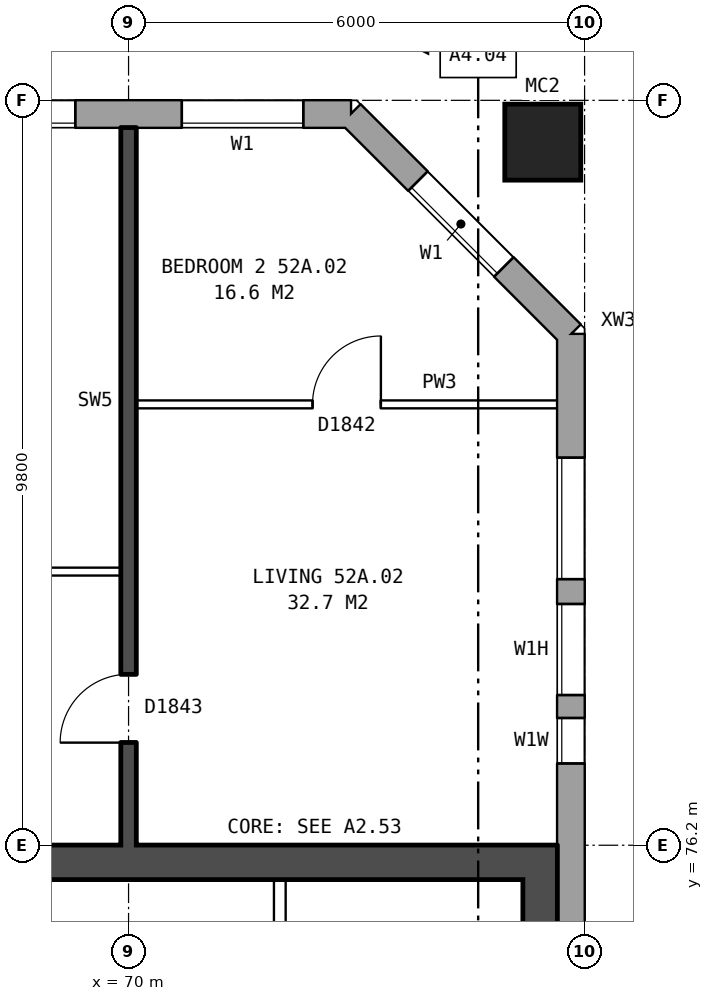
"""IFC4 building model, lengths in metres.
Left out: names, types, materials, properties, quantities, classifications, styles, units other than length and angle.
Written with IfcOpenShell. Run it as: python <this file> out.ifc"""

import sys

from ifc_helpers import new_model, si_unit, direction, frame, frame_2d, origin, origin_2d, place, context, subcontext, project, spatial, rectangle, hollow_rectangle, extrude, element, fill, save


model = new_model("IFC4")
c1 = context("Model", 3, precision=1e-05, world=origin(), true_north=direction((0.0, 1.0)))
c2 = subcontext(c1, "Body", "Model", "MODEL_VIEW")
j1 = project(units=[si_unit("LENGTHUNIT", "METRE"), si_unit("PLANEANGLEUNIT", "RADIAN")], contexts=[c1])
p1 = place(None, origin())
s1 = spatial("IfcSite", under=j1, at=p1, CompositionType="ELEMENT")
p2 = place(p1, origin())
s2 = spatial("IfcBuilding", under=s1, at=p2, CompositionType="ELEMENT")
p3 = place(p2, frame((0.0, 0.0, 185.1)))
s3 = spatial("IfcBuildingStorey", under=s2, at=p3, CompositionType="ELEMENT", Elevation=185.1)
p4 = place(p3, frame((75.45, 85.45, 0.0), z_axis=(0.0, 0.0, 1.0), x_axis=(1.0, 0.0, 0.0)))
e1 = element("IfcColumn", 1, at=p4, inside=s3, PredefinedType="COLUMN", context=c2, shape_type="SweptSolid", body=[
    extrude(hollow_rectangle(XDim=1.0, YDim=1.0, WallThickness=0.055, at=origin_2d()), origin(), (0.0, 0.0, 1.0), 3.1),
])
p5 = place(p3, frame((75.82, 57.075, 0.0), z_axis=(0.0, 0.0, 1.0), x_axis=(0.0, 1.0, 0.0)))
e2 = element("IfcWall", 2, at=p5, inside=s3, PredefinedType="STANDARD", context=c2, shape_type="SweptSolid", body=[
    extrude(rectangle(XDim=25.851, YDim=0.36, at=frame_2d((12.925, 0.0))), origin(), (0.0, 0.0, 1.0), 2.85),
])
p6 = place(p5, frame((1.625, 0.0, 0.8)))
e3 = element("IfcOpeningElement", 3, at=p6, cuts=e2, PredefinedType="OPENING", context=c2, shape_type="SweptSolid", body=[
    extrude(rectangle(XDim=1.6, YDim=1.8, at=frame_2d((0.8, 0.9))), frame((0.0, 0.19, 0.0), z_axis=(0.0, -1.0, 0.0), x_axis=(1.0, 0.0, 0.0)), (0.0, 0.0, 1.0), 0.38),
])
p7 = place(p5, frame((3.525, 0.0, 0.8)))
e4 = element("IfcOpeningElement", 4, at=p7, cuts=e2, PredefinedType="OPENING", context=c2, shape_type="SweptSolid", body=[
    extrude(rectangle(XDim=0.8, YDim=1.8, at=frame_2d((0.4, 0.9))), frame((0.0, 0.19, 0.0), z_axis=(0.0, -1.0, 0.0), x_axis=(1.0, 0.0, 0.0)), (0.0, 0.0, 1.0), 0.38),
])
p8 = place(p5, frame((20.2, 0.0, 0.8)))
e5 = element("IfcOpeningElement", 5, at=p8, cuts=e2, PredefinedType="OPENING", context=c2, shape_type="SweptSolid", body=[
    extrude(rectangle(XDim=0.6, YDim=0.9, at=frame_2d((0.3, 0.45))), frame((0.0, 0.19, 0.0), z_axis=(0.0, -1.0, 0.0), x_axis=(1.0, 0.0, 0.0)), (0.0, 0.0, 1.0), 0.38),
])
p9 = place(p5, frame((22.625, 0.0, 0.8)))
e6 = element("IfcOpeningElement", 6, at=p9, cuts=e2, PredefinedType="OPENING", context=c2, shape_type="SweptSolid", body=[
    extrude(rectangle(XDim=1.6, YDim=1.8, at=frame_2d((0.8, 0.9))), frame((0.0, 0.19, 0.0), z_axis=(0.0, -1.0, 0.0), x_axis=(1.0, 0.0, 0.0)), (0.0, 0.0, 1.0), 0.38),
])
p10 = place(p5, frame((4.625, 0.0, 0.8)))
e7 = element("IfcOpeningElement", 7, at=p10, cuts=e2, PredefinedType="OPENING", context=c2, shape_type="SweptSolid", body=[
    extrude(rectangle(XDim=1.0, YDim=0.9, at=frame_2d((0.5, 0.45))), frame((0.0, 0.19, 0.0), z_axis=(0.0, -1.0, 0.0), x_axis=(1.0, 0.0, 0.0)), (0.0, 0.0, 1.0), 0.38),
])
p11 = place(p5, frame((21.1, 0.0, 0.8)))
e8 = element("IfcOpeningElement", 8, at=p11, cuts=e2, PredefinedType="OPENING", context=c2, shape_type="SweptSolid", body=[
    extrude(rectangle(XDim=1.2, YDim=1.5, at=frame_2d((0.6, 0.75))), frame((0.0, 0.19, 0.0), z_axis=(0.0, -1.0, 0.0), x_axis=(1.0, 0.0, 0.0)), (0.0, 0.0, 1.0), 0.38),
])
p12 = place(p3, frame((75.82, 82.925, 0.0), z_axis=(0.0, 0.0, 1.0), x_axis=(-0.707106781187, 0.707106781187, 0.0)))
e9 = element("IfcWall", 9, at=p12, inside=s3, PredefinedType="STANDARD", context=c2, shape_type="SweptSolid", body=[
    extrude(rectangle(XDim=4.094, YDim=0.36, at=frame_2d((2.047, 0.0))), origin(), (0.0, 0.0, 1.0), 2.85),
])
p13 = place(p12, frame((1.247, 0.0, 0.8)))
e10 = element("IfcOpeningElement", 10, at=p13, cuts=e9, PredefinedType="OPENING", context=c2, shape_type="SweptSolid", body=[
    extrude(rectangle(XDim=1.6, YDim=1.8, at=frame_2d((0.8, 0.9))), frame((0.0, 0.19, 0.0), z_axis=(0.0, -1.0, 0.0), x_axis=(1.0, 0.0, 0.0)), (0.0, 0.0, 1.0), 0.38),
])
p14 = place(p3, frame((72.925, 85.82, 0.0), z_axis=(0.0, 0.0, 1.0), x_axis=(-1.0, 0.0, 0.0)))
e11 = element("IfcWall", 11, at=p14, inside=s3, PredefinedType="STANDARD", context=c2, shape_type="SweptSolid", body=[
    extrude(rectangle(XDim=39.601, YDim=0.36, at=frame_2d((19.8, 0.0))), origin(), (0.0, 0.0, 1.0), 2.85),
])
p15 = place(p14, frame((0.625, 0.0, 0.8)))
e12 = element("IfcOpeningElement", 12, at=p15, cuts=e11, PredefinedType="OPENING", context=c2, shape_type="SweptSolid", body=[
    extrude(rectangle(XDim=1.6, YDim=1.8, at=frame_2d((0.8, 0.9))), frame((0.0, 0.19, 0.0), z_axis=(0.0, -1.0, 0.0), x_axis=(1.0, 0.0, 0.0)), (0.0, 0.0, 1.0), 0.38),
])
p16 = place(p14, frame((3.625, 0.0, 0.8)))
e13 = element("IfcOpeningElement", 13, at=p16, cuts=e11, PredefinedType="OPENING", context=c2, shape_type="SweptSolid", body=[
    extrude(rectangle(XDim=1.6, YDim=1.8, at=frame_2d((0.8, 0.9))), frame((0.0, 0.19, 0.0), z_axis=(0.0, -1.0, 0.0), x_axis=(1.0, 0.0, 0.0)), (0.0, 0.0, 1.0), 0.38),
])
p17 = place(p14, frame((6.625, 0.0, 0.8)))
e14 = element("IfcOpeningElement", 14, at=p17, cuts=e11, PredefinedType="OPENING", context=c2, shape_type="SweptSolid", body=[
    extrude(rectangle(XDim=1.6, YDim=1.8, at=frame_2d((0.8, 0.9))), frame((0.0, 0.19, 0.0), z_axis=(0.0, -1.0, 0.0), x_axis=(1.0, 0.0, 0.0)), (0.0, 0.0, 1.0), 0.38),
])
p18 = place(p14, frame((9.625, 0.0, 0.8)))
e15 = element("IfcOpeningElement", 15, at=p18, cuts=e11, PredefinedType="OPENING", context=c2, shape_type="SweptSolid", body=[
    extrude(rectangle(XDim=1.6, YDim=1.8, at=frame_2d((0.8, 0.9))), frame((0.0, 0.19, 0.0), z_axis=(0.0, -1.0, 0.0), x_axis=(1.0, 0.0, 0.0)), (0.0, 0.0, 1.0), 0.38),
])
p19 = place(p14, frame((13.525, 0.0, 0.65)))
e16 = element("IfcOpeningElement", 16, at=p19, cuts=e11, PredefinedType="OPENING", context=c2, shape_type="SweptSolid", body=[
    extrude(rectangle(XDim=1.2, YDim=1.5, at=frame_2d((0.6, 0.75))), frame((0.0, 0.19, 0.0), z_axis=(0.0, -1.0, 0.0), x_axis=(1.0, 0.0, 0.0)), (0.0, 0.0, 1.0), 0.38),
])
p20 = place(p14, frame((15.625, 0.0, 0.8)))
e17 = element("IfcOpeningElement", 17, at=p20, cuts=e11, PredefinedType="OPENING", context=c2, shape_type="SweptSolid", body=[
    extrude(rectangle(XDim=1.6, YDim=1.8, at=frame_2d((0.8, 0.9))), frame((0.0, 0.19, 0.0), z_axis=(0.0, -1.0, 0.0), x_axis=(1.0, 0.0, 0.0)), (0.0, 0.0, 1.0), 0.38),
])
p21 = place(p14, frame((18.625, 0.0, 0.8)))
e18 = element("IfcOpeningElement", 18, at=p21, cuts=e11, PredefinedType="OPENING", context=c2, shape_type="SweptSolid", body=[
    extrude(rectangle(XDim=1.6, YDim=1.8, at=frame_2d((0.8, 0.9))), frame((0.0, 0.19, 0.0), z_axis=(0.0, -1.0, 0.0), x_axis=(1.0, 0.0, 0.0)), (0.0, 0.0, 1.0), 0.38),
])
p22 = place(p14, frame((21.625, 0.0, 0.8)))
e19 = element("IfcOpeningElement", 19, at=p22, cuts=e11, PredefinedType="OPENING", context=c2, shape_type="SweptSolid", body=[
    extrude(rectangle(XDim=1.6, YDim=1.8, at=frame_2d((0.8, 0.9))), frame((0.0, 0.19, 0.0), z_axis=(0.0, -1.0, 0.0), x_axis=(1.0, 0.0, 0.0)), (0.0, 0.0, 1.0), 0.38),
])
p23 = place(p14, frame((24.075, 0.0, 0.8)))
e20 = element("IfcOpeningElement", 20, at=p23, cuts=e11, PredefinedType="OPENING", context=c2, shape_type="SweptSolid", body=[
    extrude(rectangle(XDim=1.4, YDim=1.8, at=frame_2d((0.7, 0.9))), frame((0.0, 0.19, 0.0), z_axis=(0.0, -1.0, 0.0), x_axis=(1.0, 0.0, 0.0)), (0.0, 0.0, 1.0), 0.38),
])
p24 = place(p14, frame((27.625, 0.0, 1.7)))
e21 = element("IfcOpeningElement", 21, at=p24, cuts=e11, PredefinedType="OPENING", context=c2, shape_type="SweptSolid", body=[
    extrude(rectangle(XDim=0.8, YDim=0.9, at=frame_2d((0.4, 0.45))), frame((0.0, 0.19, 0.0), z_axis=(0.0, -1.0, 0.0), x_axis=(1.0, 0.0, 0.0)), (0.0, 0.0, 1.0), 0.38),
])
p25 = place(p14, frame((30.625, 0.0, 0.8)))
e22 = element("IfcOpeningElement", 22, at=p25, cuts=e11, PredefinedType="OPENING", context=c2, shape_type="SweptSolid", body=[
    extrude(rectangle(XDim=1.6, YDim=1.8, at=frame_2d((0.8, 0.9))), frame((0.0, 0.19, 0.0), z_axis=(0.0, -1.0, 0.0), x_axis=(1.0, 0.0, 0.0)), (0.0, 0.0, 1.0), 0.38),
])
p26 = place(p14, frame((33.625, 0.0, 0.8)))
e23 = element("IfcOpeningElement", 23, at=p26, cuts=e11, PredefinedType="OPENING", context=c2, shape_type="SweptSolid", body=[
    extrude(rectangle(XDim=1.6, YDim=1.8, at=frame_2d((0.8, 0.9))), frame((0.0, 0.19, 0.0), z_axis=(0.0, -1.0, 0.0), x_axis=(1.0, 0.0, 0.0)), (0.0, 0.0, 1.0), 0.38),
])
p27 = place(p14, frame((36.625, 0.0, 0.8)))
e24 = element("IfcOpeningElement", 24, at=p27, cuts=e11, PredefinedType="OPENING", context=c2, shape_type="SweptSolid", body=[
    extrude(rectangle(XDim=1.6, YDim=1.8, at=frame_2d((0.8, 0.9))), frame((0.0, 0.19, 0.0), z_axis=(0.0, -1.0, 0.0), x_axis=(1.0, 0.0, 0.0)), (0.0, 0.0, 1.0), 0.38),
])
p28 = place(p14, frame((25.775, 0.0, 0.8)))
e25 = element("IfcOpeningElement", 25, at=p28, cuts=e11, PredefinedType="OPENING", context=c2, shape_type="SweptSolid", body=[
    extrude(rectangle(XDim=0.6, YDim=0.9, at=frame_2d((0.3, 0.45))), frame((0.0, 0.19, 0.0), z_axis=(0.0, -1.0, 0.0), x_axis=(1.0, 0.0, 0.0)), (0.0, 0.0, 1.0), 0.38),
])
p29 = place(p14, frame((28.725, 0.0, 0.8)))
e26 = element("IfcOpeningElement", 26, at=p29, cuts=e11, PredefinedType="OPENING", context=c2, shape_type="SweptSolid", body=[
    extrude(rectangle(XDim=1.6, YDim=1.8, at=frame_2d((0.8, 0.9))), frame((0.0, 0.19, 0.0), z_axis=(0.0, -1.0, 0.0), x_axis=(1.0, 0.0, 0.0)), (0.0, 0.0, 1.0), 0.38),
])
p30 = place(p3, frame((75.415, 63.8, 0.0), z_axis=(0.0, 0.0, 1.0), x_axis=(0.0, 1.0, 0.0)))
e27 = element("IfcWall", 27, at=p30, inside=s3, PredefinedType="SHEAR", context=c2, shape_type="SweptSolid", body=[
    extrude(rectangle(XDim=12.4, YDim=0.45, at=frame_2d((6.2, 0.0))), origin(), (0.0, 0.0, 1.0), 2.85),
])
p31 = place(p3, frame((67.09, 75.975, 0.0), z_axis=(0.0, 0.0, 1.0), x_axis=(1.0, 0.0, 0.0)))
e28 = element("IfcWall", 28, at=p31, inside=s3, PredefinedType="SHEAR", context=c2, shape_type="SweptSolid", body=[
    extrude(rectangle(XDim=8.1, YDim=0.45, at=frame_2d((4.05, 0.0))), origin(), (0.0, 0.0, 1.0), 2.85),
])
p32 = place(p3, frame((71.99, 73.45, 0.0), z_axis=(0.0, 0.0, 1.0), x_axis=(0.0, 1.0, 0.0)))
e29 = element("IfcWall", 29, at=p32, inside=s3, PredefinedType="PARTITIONING", context=c2, shape_type="SweptSolid", body=[
    extrude(rectangle(XDim=2.3, YDim=0.15, at=frame_2d((1.15, 0.0))), origin(), (0.0, 0.0, 1.0), 2.85),
])
p33 = place(p32, frame((0.725, 0.0, 0.0)))
e30 = element("IfcOpeningElement", 30, at=p33, cuts=e29, PredefinedType="OPENING", context=c2, shape_type="SweptSolid", body=[
    extrude(rectangle(XDim=0.85, YDim=2.1, at=frame_2d((0.425, 1.05))), frame((0.0, 0.085, 0.0), z_axis=(0.0, -1.0, 0.0), x_axis=(1.0, 0.0, 0.0)), (0.0, 0.0, 1.0), 0.17),
])
p34 = place(p3, frame((64.1, 79.8, 0.0), z_axis=(0.0, 0.0, 1.0), x_axis=(1.0, 0.0, 0.0)))
e31 = element("IfcWall", 31, at=p34, inside=s3, PredefinedType="PARTITIONING", context=c2, shape_type="SweptSolid", body=[
    extrude(rectangle(XDim=5.8, YDim=0.1, at=frame_2d((2.9, 0.0))), origin(), (0.0, 0.0, 1.0), 2.85),
])
p35 = place(p34, frame((3.6, 0.0, 0.0)))
e32 = element("IfcOpeningElement", 32, at=p35, cuts=e31, PredefinedType="OPENING", context=c2, shape_type="SweptSolid", body=[
    extrude(rectangle(XDim=0.9, YDim=2.1, at=frame_2d((0.45, 1.05))), frame((0.0, 0.06, 0.0), z_axis=(0.0, -1.0, 0.0), x_axis=(1.0, 0.0, 0.0)), (0.0, 0.0, 1.0), 0.12),
])
p36 = place(p34, frame((0.7, 0.0, 0.0)))
e33 = element("IfcOpeningElement", 33, at=p36, cuts=e31, PredefinedType="OPENING", context=c2, shape_type="SweptSolid", body=[
    extrude(rectangle(XDim=0.9, YDim=2.1, at=frame_2d((0.45, 1.05))), frame((0.0, 0.06, 0.0), z_axis=(0.0, -1.0, 0.0), x_axis=(1.0, 0.0, 0.0)), (0.0, 0.0, 1.0), 0.12),
])
p37 = place(p3, frame((70.1, 82.0, 0.0), z_axis=(0.0, 0.0, 1.0), x_axis=(1.0, 0.0, 0.0)))
e34 = element("IfcWall", 34, at=p37, inside=s3, PredefinedType="PARTITIONING", context=c2, shape_type="SweptSolid", body=[
    extrude(rectangle(XDim=5.54, YDim=0.1, at=frame_2d((2.77, 0.0))), origin(), (0.0, 0.0, 1.0), 2.85),
])
p38 = place(p37, frame((2.32, 0.0, 0.0)))
e35 = element("IfcOpeningElement", 35, at=p38, cuts=e34, PredefinedType="OPENING", context=c2, shape_type="SweptSolid", body=[
    extrude(rectangle(XDim=0.9, YDim=2.1, at=frame_2d((0.45, 1.05))), frame((0.0, 0.06, 0.0), z_axis=(0.0, -1.0, 0.0), x_axis=(1.0, 0.0, 0.0)), (0.0, 0.0, 1.0), 0.12),
])
p39 = place(p3, frame((70.0, 76.2, 0.0), z_axis=(0.0, 0.0, 1.0), x_axis=(0.0, 1.0, 0.0)))
e36 = element("IfcWall", 36, at=p39, inside=s3, PredefinedType="SOLIDWALL", context=c2, shape_type="SweptSolid", body=[
    extrude(rectangle(XDim=9.44, YDim=0.2, at=frame_2d((4.72, 0.0))), origin(), (0.0, 0.0, 1.0), 2.85),
])
p40 = place(p39, frame((1.35, 0.0, 0.0)))
e37 = element("IfcOpeningElement", 37, at=p40, cuts=e36, PredefinedType="OPENING", context=c2, shape_type="SweptSolid", body=[
    extrude(rectangle(XDim=0.9, YDim=2.1, at=frame_2d((0.45, 1.05))), frame((0.0, 0.11, 0.0), z_axis=(0.0, -1.0, 0.0), x_axis=(1.0, 0.0, 0.0)), (0.0, 0.0, 1.0), 0.22),
])
p41 = place(p8, origin())
e38 = element("IfcWindow", 38, at=p41, inside=s3, PartitioningType="SINGLE_PANEL", PredefinedType="WINDOW", context=c2, shape_type="SweptSolid", body=[
    extrude(rectangle(XDim=0.6, YDim=0.9, at=frame_2d((0.3, 0.45))), frame((0.0, 0.15, 0.0), z_axis=(0.0, -1.0, 0.0), x_axis=(1.0, 0.0, 0.0)), (0.0, 0.0, 1.0), 0.06),
])
fill(e5, e38)
p42 = place(p9, origin())
e39 = element("IfcWindow", 39, at=p42, inside=s3, PartitioningType="SINGLE_PANEL", PredefinedType="WINDOW", context=c2, shape_type="SweptSolid", body=[
    extrude(rectangle(XDim=1.6, YDim=1.8, at=frame_2d((0.8, 0.9))), frame((0.0, 0.15, 0.0), z_axis=(0.0, -1.0, 0.0), x_axis=(1.0, 0.0, 0.0)), (0.0, 0.0, 1.0), 0.06),
])
fill(e6, e39)
p43 = place(p13, origin())
e40 = element("IfcWindow", 40, at=p43, inside=s3, PartitioningType="SINGLE_PANEL", PredefinedType="WINDOW", context=c2, shape_type="SweptSolid", body=[
    extrude(rectangle(XDim=1.6, YDim=1.8, at=frame_2d((0.8, 0.9))), frame((0.0, 0.15, 0.0), z_axis=(0.0, -1.0, 0.0), x_axis=(1.0, 0.0, 0.0)), (0.0, 0.0, 1.0), 0.06),
])
fill(e10, e40)
p44 = place(p15, origin())
e41 = element("IfcWindow", 41, at=p44, inside=s3, PartitioningType="SINGLE_PANEL", PredefinedType="WINDOW", context=c2, shape_type="SweptSolid", body=[
    extrude(rectangle(XDim=1.6, YDim=1.8, at=frame_2d((0.8, 0.9))), frame((0.0, 0.15, 0.0), z_axis=(0.0, -1.0, 0.0), x_axis=(1.0, 0.0, 0.0)), (0.0, 0.0, 1.0), 0.06),
])
fill(e12, e41)
p45 = place(p16, origin())
e42 = element("IfcWindow", 42, at=p45, inside=s3, PartitioningType="SINGLE_PANEL", PredefinedType="WINDOW", context=c2, shape_type="SweptSolid", body=[
    extrude(rectangle(XDim=1.6, YDim=1.8, at=frame_2d((0.8, 0.9))), frame((0.0, 0.15, 0.0), z_axis=(0.0, -1.0, 0.0), x_axis=(1.0, 0.0, 0.0)), (0.0, 0.0, 1.0), 0.06),
])
fill(e13, e42)
p46 = place(p38, origin())
e43 = element("IfcDoor", 43, at=p46, inside=s3, OperationType="SINGLE_SWING_RIGHT", PredefinedType="DOOR", context=c2, shape_type="SweptSolid", body=[
    extrude(rectangle(XDim=0.9, YDim=2.1, at=frame_2d((0.45, 1.05))), frame((0.0, 0.025, 0.0), z_axis=(0.0, -1.0, 0.0), x_axis=(1.0, 0.0, 0.0)), (0.0, 0.0, 1.0), 0.05),
])
fill(e35, e43)
p47 = place(p40, origin())
e44 = element("IfcDoor", 44, at=p47, inside=s3, OperationType="SINGLE_SWING_LEFT", PredefinedType="DOOR", context=c2, shape_type="SweptSolid", body=[
    extrude(rectangle(XDim=0.9, YDim=2.1, at=frame_2d((0.45, 1.05))), frame((0.0, 0.025, 0.0), z_axis=(0.0, -1.0, 0.0), x_axis=(1.0, 0.0, 0.0)), (0.0, 0.0, 1.0), 0.05),
])
fill(e37, e44)
p48 = place(p11, origin())
e45 = element("IfcWindow", 45, at=p48, inside=s3, PartitioningType="SINGLE_PANEL", PredefinedType="WINDOW", context=c2, shape_type="SweptSolid", body=[
    extrude(rectangle(XDim=1.2, YDim=1.5, at=frame_2d((0.6, 0.75))), frame((0.0, 0.15, 0.0), z_axis=(0.0, -1.0, 0.0), x_axis=(1.0, 0.0, 0.0)), (0.0, 0.0, 1.0), 0.06),
])
fill(e8, e45)
save(model, sys.argv[1])
